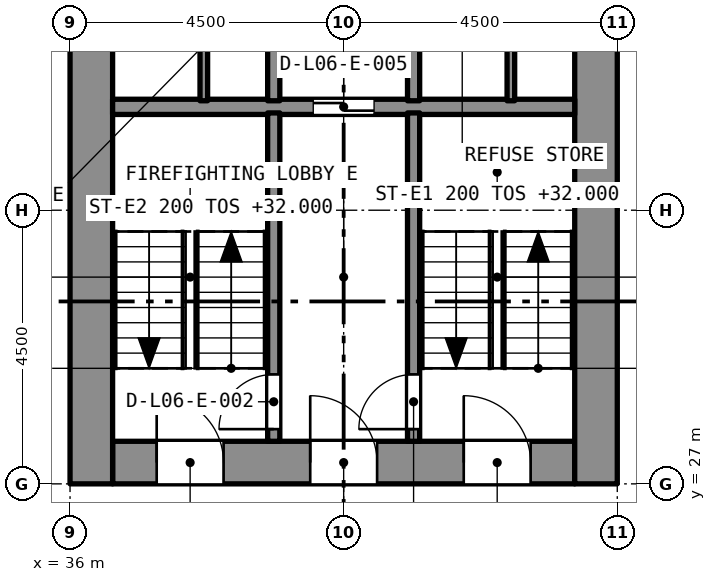
"""IFC4 building model, lengths in metres.
Left out: names, types, materials, properties, quantities, classifications, styles, units other than length and angle.
Written with IfcOpenShell. Run it as: python <this file> out.ifc"""

import sys

from ifc_helpers import new_model, si_unit, direction, frame, frame_2d, origin, place, context, subcontext, project, spatial, rectangle, extrude, element, fill, save


model = new_model("IFC4")
c1 = context("Model", 3, precision=1e-05, world=origin(), true_north=direction((0.0, 1.0)))
c2 = subcontext(c1, "Body", "Model", "MODEL_VIEW")
j1 = project(units=[si_unit("LENGTHUNIT", "METRE"), si_unit("PLANEANGLEUNIT", "RADIAN")], contexts=[c1])
p1 = place(None, origin())
s1 = spatial("IfcSite", under=j1, at=p1, CompositionType="ELEMENT")
p2 = place(p1, origin())
s2 = spatial("IfcBuilding", under=s1, at=p2, CompositionType="ELEMENT")
p3 = place(p2, frame((0.0, 0.0, 30.4)))
s3 = spatial("IfcBuildingStorey", under=s2, at=p3, CompositionType="ELEMENT", Elevation=30.4)
p4 = place(p3, frame((36.7, 27.35, 0.0), z_axis=(0.0, 0.0, 1.0), x_axis=(1.0, 0.0, 0.0)))
e1 = element("IfcWall", 1, at=p4, inside=s3, PredefinedType="SOLIDWALL", context=c2, shape_type="SweptSolid", body=[
    extrude(rectangle(XDim=7.6, YDim=0.7, at=frame_2d((3.8, 0.0))), origin(), (0.0, 0.0, 1.0), 3.2),
])
p5 = place(p4, frame((5.775, 0.0, 0.0)))
e2 = element("IfcOpeningElement", 2, at=p5, cuts=e1, PredefinedType="OPENING", context=c2, shape_type="SweptSolid", body=[
    extrude(rectangle(XDim=1.1, YDim=2.1, at=frame_2d((0.55, 1.05))), frame((0.0, 0.36, 0.0), z_axis=(0.0, -1.0, 0.0), x_axis=(1.0, 0.0, 0.0)), (0.0, 0.0, 1.0), 0.72),
])
p6 = place(p4, frame((3.25, 0.0, 0.0)))
e3 = element("IfcOpeningElement", 3, at=p6, cuts=e1, PredefinedType="OPENING", context=c2, shape_type="SweptSolid", body=[
    extrude(rectangle(XDim=1.1, YDim=2.1, at=frame_2d((0.55, 1.05))), frame((0.0, 0.36, 0.0), z_axis=(0.0, -1.0, 0.0), x_axis=(1.0, 0.0, 0.0)), (0.0, 0.0, 1.0), 0.72),
])
p7 = place(p4, frame((0.725, 0.0, 0.0)))
e4 = element("IfcOpeningElement", 4, at=p7, cuts=e1, PredefinedType="OPENING", context=c2, shape_type="SweptSolid", body=[
    extrude(rectangle(XDim=1.1, YDim=2.1, at=frame_2d((0.55, 1.05))), frame((0.0, 0.36, 0.0), z_axis=(0.0, -1.0, 0.0), x_axis=(1.0, 0.0, 0.0)), (0.0, 0.0, 1.0), 0.72),
])
p8 = place(p3, frame((36.35, 27.0, 0.0), z_axis=(0.0, 0.0, 1.0), x_axis=(0.0, 1.0, 0.0)))
e5 = element("IfcWall", 5, at=p8, inside=s3, PredefinedType="SOLIDWALL", context=c2, shape_type="SweptSolid", body=[
    extrude(rectangle(XDim=13.5, YDim=0.7, at=frame_2d((6.75, 0.0))), origin(), (0.0, 0.0, 1.0), 3.2),
])
p9 = place(p8, frame((8.95, 0.0, 0.0)))
e6 = element("IfcOpeningElement", 6, at=p9, cuts=e5, PredefinedType="OPENING", context=c2, shape_type="SweptSolid", body=[
    extrude(rectangle(XDim=1.2, YDim=2.1, at=frame_2d((0.6, 1.05))), frame((0.0, 0.36, 0.0), z_axis=(0.0, -1.0, 0.0), x_axis=(1.0, 0.0, 0.0)), (0.0, 0.0, 1.0), 0.72),
])
p10 = place(p3, frame((44.65, 27.0, 0.0), z_axis=(0.0, 0.0, 1.0), x_axis=(0.0, 1.0, 0.0)))
e7 = element("IfcWall", 7, at=p10, inside=s3, PredefinedType="SOLIDWALL", context=c2, shape_type="SweptSolid", body=[
    extrude(rectangle(XDim=13.5, YDim=0.7, at=frame_2d((6.75, 0.0))), origin(), (0.0, 0.0, 1.0), 3.2),
])
p11 = place(p10, frame((8.95, 0.0, 0.0)))
e8 = element("IfcOpeningElement", 8, at=p11, cuts=e7, PredefinedType="OPENING", context=c2, shape_type="SweptSolid", body=[
    extrude(rectangle(XDim=1.2, YDim=2.1, at=frame_2d((0.6, 1.05))), frame((0.0, 0.36, 0.0), z_axis=(0.0, -1.0, 0.0), x_axis=(1.0, 0.0, 0.0)), (0.0, 0.0, 1.0), 0.72),
])
p12 = place(p3, frame((36.7, 33.2, 0.0), z_axis=(0.0, 0.0, 1.0), x_axis=(1.0, 0.0, 0.0)))
e9 = element("IfcWall", 9, at=p12, inside=s3, PredefinedType="SOLIDWALL", context=c2, shape_type="SweptSolid", body=[
    extrude(rectangle(XDim=7.6, YDim=0.25, at=frame_2d((3.8, 0.0))), origin(), (0.0, 0.0, 1.0), 2.9),
])
p13 = place(p12, frame((3.3, 0.0, 0.0)))
e10 = element("IfcOpeningElement", 10, at=p13, cuts=e9, PredefinedType="OPENING", context=c2, shape_type="SweptSolid", body=[
    extrude(rectangle(XDim=1.0, YDim=2.1, at=frame_2d((0.5, 1.05))), frame((0.0, 0.135, 0.0), z_axis=(0.0, -1.0, 0.0), x_axis=(1.0, 0.0, 0.0)), (0.0, 0.0, 1.0), 0.27),
])
p14 = place(p3, frame((41.65, 27.7, 0.0), z_axis=(0.0, 0.0, 1.0), x_axis=(0.0, 1.0, 0.0)))
e11 = element("IfcWall", 11, at=p14, inside=s3, PredefinedType="SOLIDWALL", context=c2, shape_type="SweptSolid", body=[
    extrude(rectangle(XDim=5.4, YDim=0.2, at=frame_2d((2.7, 0.0))), origin(), (0.0, 0.0, 1.0), 2.9),
])
p15 = place(p14, frame((0.2, 0.0, 0.0)))
e12 = element("IfcOpeningElement", 12, at=p15, cuts=e11, PredefinedType="OPENING", context=c2, shape_type="SweptSolid", body=[
    extrude(rectangle(XDim=0.9, YDim=2.1, at=frame_2d((0.45, 1.05))), frame((0.0, 0.11, 0.0), z_axis=(0.0, -1.0, 0.0), x_axis=(1.0, 0.0, 0.0)), (0.0, 0.0, 1.0), 0.22),
])
p16 = place(p3, frame((39.35, 27.7, 0.0), z_axis=(0.0, 0.0, 1.0), x_axis=(0.0, 1.0, 0.0)))
e13 = element("IfcWall", 13, at=p16, inside=s3, PredefinedType="SOLIDWALL", context=c2, shape_type="SweptSolid", body=[
    extrude(rectangle(XDim=5.4, YDim=0.2, at=frame_2d((2.7, 0.0))), origin(), (0.0, 0.0, 1.0), 2.9),
])
p17 = place(p16, frame((0.2, 0.0, 0.0)))
e14 = element("IfcOpeningElement", 14, at=p17, cuts=e13, PredefinedType="OPENING", context=c2, shape_type="SweptSolid", body=[
    extrude(rectangle(XDim=0.9, YDim=2.1, at=frame_2d((0.45, 1.05))), frame((0.0, 0.11, 0.0), z_axis=(0.0, -1.0, 0.0), x_axis=(1.0, 0.0, 0.0)), (0.0, 0.0, 1.0), 0.22),
])
for number, where, z_axis, x_axis in (
    (15, (41.65, 33.3, 0.0), (0.0, 0.0, 1.0), (0.0, 1.0, 0.0)),
    (16, (39.35, 33.3, 0.0), (0.0, 0.0, 1.0), (0.0, 1.0, 0.0)),
):
    element("IfcWall", number, at=place(p3, frame(where, z_axis=z_axis, x_axis=x_axis)), inside=s3, PredefinedType="SOLIDWALL", context=c2, shape_type="SweptSolid", body=[
        extrude(rectangle(XDim=2.3, YDim=0.2, at=frame_2d((1.15, 0.0))), origin(), (0.0, 0.0, 1.0), 2.9),
    ])
for number, where, z_axis, x_axis in (
    (17, (43.25, 33.3, 0.0), (0.0, 0.0, 1.0), (0.0, 1.0, 0.0)),
    (18, (38.2, 33.3, 0.0), (0.0, 0.0, 1.0), (0.0, 1.0, 0.0)),
):
    element("IfcWall", number, at=place(p3, frame(where, z_axis=z_axis, x_axis=x_axis)), inside=s3, PredefinedType="PARTITIONING", context=c2, shape_type="SweptSolid", body=[
        extrude(rectangle(XDim=2.3, YDim=0.125, at=frame_2d((1.15, 0.0))), origin(), (0.0, 0.0, 1.0), 2.9),
    ])
p18 = place(p15, origin())
e19 = element("IfcDoor", 19, at=p18, inside=s3, OperationType="SINGLE_SWING_LEFT", PredefinedType="DOOR", context=c2, shape_type="SweptSolid", body=[
    extrude(rectangle(XDim=0.9, YDim=2.1, at=frame_2d((0.45, 1.05))), frame((0.0, 0.025, 0.0), z_axis=(0.0, -1.0, 0.0), x_axis=(1.0, 0.0, 0.0)), (0.0, 0.0, 1.0), 0.05),
])
fill(e12, e19)
p19 = place(p17, origin())
e20 = element("IfcDoor", 20, at=p19, inside=s3, OperationType="SINGLE_SWING_LEFT", PredefinedType="DOOR", context=c2, shape_type="SweptSolid", body=[
    extrude(rectangle(XDim=0.9, YDim=2.1, at=frame_2d((0.45, 1.05))), frame((0.0, 0.025, 0.0), z_axis=(0.0, -1.0, 0.0), x_axis=(1.0, 0.0, 0.0)), (0.0, 0.0, 1.0), 0.05),
])
fill(e14, e20)
p20 = place(p13, origin())
e21 = element("IfcDoor", 21, at=p20, inside=s3, OperationType="SLIDING_TO_LEFT", PredefinedType="DOOR", context=c2, shape_type="SweptSolid", body=[
    extrude(rectangle(XDim=1.0, YDim=2.1, at=frame_2d((0.5, 1.05))), frame((0.0, 0.025, 0.0), z_axis=(0.0, -1.0, 0.0), x_axis=(1.0, 0.0, 0.0)), (0.0, 0.0, 1.0), 0.05),
])
fill(e10, e21)
p21 = place(p5, origin())
e22 = element("IfcDoor", 22, at=p21, inside=s3, OperationType="SINGLE_SWING_LEFT", PredefinedType="DOOR", context=c2, shape_type="SweptSolid", body=[
    extrude(rectangle(XDim=1.1, YDim=2.1, at=frame_2d((0.55, 1.05))), frame((0.0, 0.025, 0.0), z_axis=(0.0, -1.0, 0.0), x_axis=(1.0, 0.0, 0.0)), (0.0, 0.0, 1.0), 0.05),
])
fill(e2, e22)
p22 = place(p6, origin())
e23 = element("IfcDoor", 23, at=p22, inside=s3, OperationType="SINGLE_SWING_LEFT", PredefinedType="DOOR", context=c2, shape_type="SweptSolid", body=[
    extrude(rectangle(XDim=1.1, YDim=2.1, at=frame_2d((0.55, 1.05))), frame((0.0, 0.025, 0.0), z_axis=(0.0, -1.0, 0.0), x_axis=(1.0, 0.0, 0.0)), (0.0, 0.0, 1.0), 0.05),
])
fill(e3, e23)
p23 = place(p7, origin())
e24 = element("IfcDoor", 24, at=p23, inside=s3, OperationType="SINGLE_SWING_LEFT", PredefinedType="DOOR", context=c2, shape_type="SweptSolid", body=[
    extrude(rectangle(XDim=1.1, YDim=2.1, at=frame_2d((0.55, 1.05))), frame((0.0, 0.025, 0.0), z_axis=(0.0, -1.0, 0.0), x_axis=(1.0, 0.0, 0.0)), (0.0, 0.0, 1.0), 0.05),
])
fill(e4, e24)
save(model, sys.argv[1])
